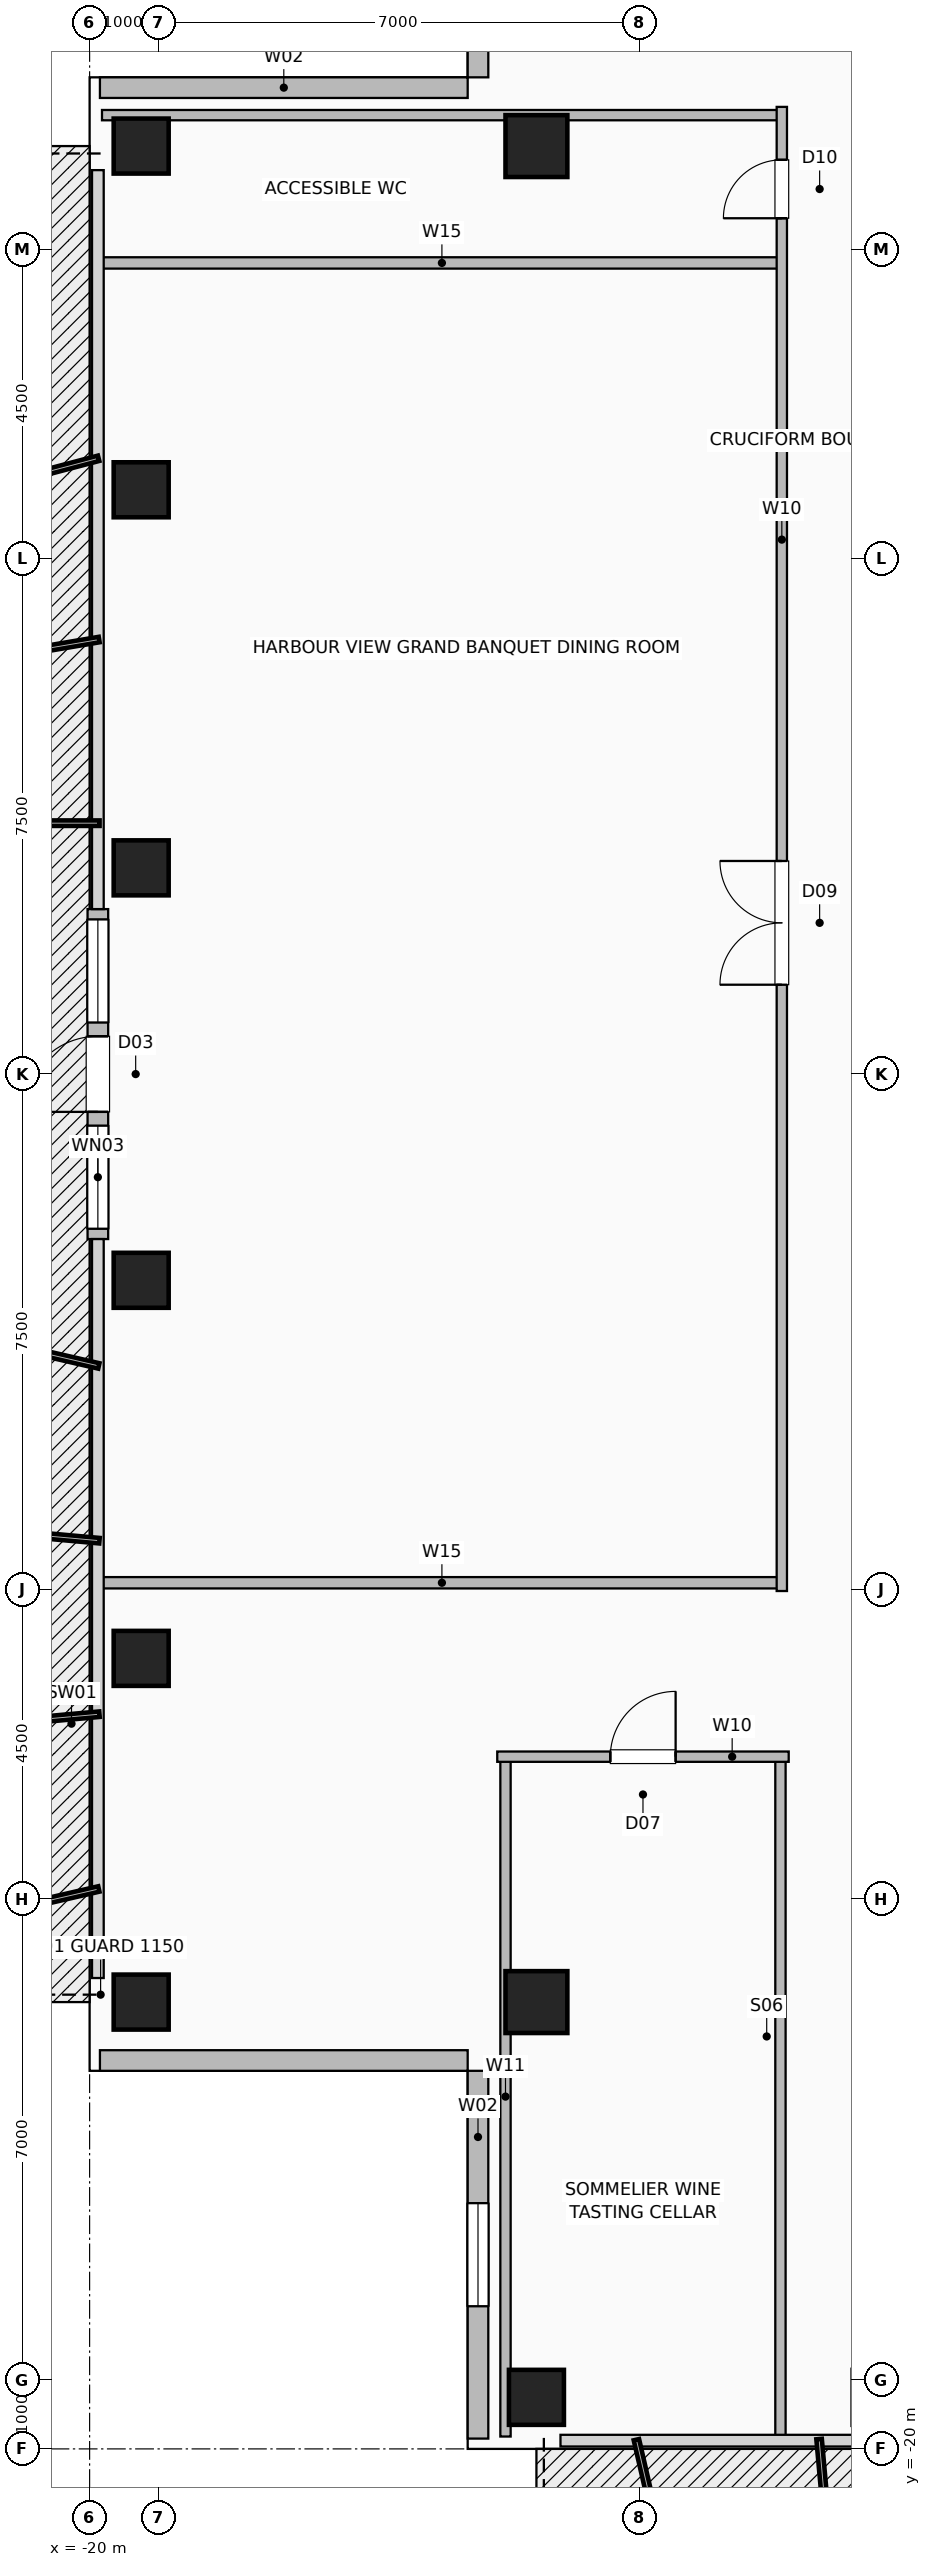
"""IFC4 building model, lengths in metres.
Left out: names, types, materials, properties, quantities, classifications, styles, units other than length and angle.
Written with IfcOpenShell. Run it as: python <this file> out.ifc"""

import sys

from ifc_helpers import new_model, si_unit, direction, frame, frame_2d, origin, origin_2d, place, context, subcontext, project, spatial, rectangle, hollow_rectangle, extrude, element, fill, save


model = new_model("IFC4")
c1 = context("Model", 3, precision=1e-05, world=origin(), true_north=direction((0.0, 1.0)))
c2 = subcontext(c1, "Body", "Model", "MODEL_VIEW")
j1 = project(units=[si_unit("LENGTHUNIT", "METRE"), si_unit("PLANEANGLEUNIT", "RADIAN")], contexts=[c1])
p1 = place(None, origin())
s1 = spatial("IfcSite", under=j1, at=p1, CompositionType="ELEMENT")
p2 = place(p1, origin())
s2 = spatial("IfcBuilding", under=s1, at=p2, CompositionType="ELEMENT")
p3 = place(p2, frame((0.0, 0.0, 195.0)))
s3 = spatial("IfcBuildingStorey", under=s2, at=p3, CompositionType="ELEMENT", Elevation=195.0)
for number, where, z_axis, x_axis in (
    (1, (-13.5, -19.25, 0.0), (0.0, 0.0, 1.0), (1.0, 0.0, 0.0)),
    (2, (-19.25, -13.5, 0.0), (0.0, 0.0, 1.0), (1.0, 0.0, 0.0)),
    (3, (-19.25, -8.5, 0.0), (0.0, 0.0, 1.0), (1.0, 0.0, 0.0)),
    (4, (-19.25, -3.0, 0.0), (0.0, 0.0, 1.0), (1.0, 0.0, 0.0)),
    (5, (-19.25, 3.0, 0.0), (0.0, 0.0, 1.0), (1.0, 0.0, 0.0)),
    (6, (-19.25, 8.5, 0.0), (0.0, 0.0, 1.0), (1.0, 0.0, 0.0)),
    (7, (-19.25, 13.5, 0.0), (0.0, 0.0, 1.0), (1.0, 0.0, 0.0)),
):
    element("IfcColumn", number, at=place(p3, frame(where, z_axis=z_axis, x_axis=x_axis)), inside=s3, PredefinedType="COLUMN", context=c2, shape_type="SweptSolid", body=[
        extrude(hollow_rectangle(XDim=0.8, YDim=0.8, WallThickness=0.04, at=origin_2d()), origin(), (0.0, 0.0, 1.0), 3.6),
    ])
for number, where, z_axis, x_axis in (
    (8, (-13.5, -13.5, 0.0), (0.0, 0.0, 1.0), (1.0, 0.0, 0.0)),
    (9, (-13.5, 13.5, 0.0), (0.0, 0.0, 1.0), (1.0, 0.0, 0.0)),
):
    element("IfcColumn", number, at=place(p3, frame(where, z_axis=z_axis, x_axis=x_axis)), inside=s3, PredefinedType="COLUMN", context=c2, shape_type="SweptSolid", body=[
        extrude(hollow_rectangle(XDim=0.9, YDim=0.9, WallThickness=0.045, at=origin_2d()), origin(), (0.0, 0.0, 1.0), 3.6),
    ])
p4 = place(p3, frame((-19.88, -2.4, 0.0), z_axis=(0.0, 0.0, 1.0), x_axis=(0.0, 1.0, 0.0)))
e10 = element("IfcWall", 10, at=p4, inside=s3, PredefinedType="SOLIDWALL", context=c2, shape_type="SweptSolid", body=[
    extrude(rectangle(XDim=4.8, YDim=0.3, at=frame_2d((2.4, 0.0))), origin(), (0.0, 0.0, 1.0), 3.36),
])
p5 = place(p4, frame((1.85, 0.0, 0.0)))
e11 = element("IfcOpeningElement", 11, at=p5, cuts=e10, PredefinedType="OPENING", context=c2, shape_type="SweptSolid", body=[
    extrude(rectangle(XDim=1.1, YDim=2.2, at=frame_2d((0.55, 1.1))), frame((0.0, 0.16, 0.0), z_axis=(0.0, -1.0, 0.0), x_axis=(1.0, 0.0, 0.0)), (0.0, 0.0, 1.0), 0.32),
])
p6 = place(p4, frame((0.15, 0.0, 0.85)))
e12 = element("IfcOpeningElement", 12, at=p6, cuts=e10, PredefinedType="OPENING", context=c2, shape_type="SweptSolid", body=[
    extrude(rectangle(XDim=1.5, YDim=1.8, at=frame_2d((0.75, 0.9))), frame((0.0, 0.16, 0.0), z_axis=(0.0, -1.0, 0.0), x_axis=(1.0, 0.0, 0.0)), (0.0, 0.0, 1.0), 0.32),
])
p7 = place(p4, frame((3.15, 0.0, 0.85)))
e13 = element("IfcOpeningElement", 13, at=p7, cuts=e10, PredefinedType="OPENING", context=c2, shape_type="SweptSolid", body=[
    extrude(rectangle(XDim=1.5, YDim=1.8, at=frame_2d((0.75, 0.9))), frame((0.0, 0.16, 0.0), z_axis=(0.0, -1.0, 0.0), x_axis=(1.0, 0.0, 0.0)), (0.0, 0.0, 1.0), 0.32),
])
p8 = place(p3, frame((-14.35, -19.85, 0.0), z_axis=(0.0, 0.0, 1.0), x_axis=(0.0, 1.0, 0.0)))
e14 = element("IfcWall", 14, at=p8, inside=s3, PredefinedType="SOLIDWALL", context=c2, shape_type="SweptSolid", body=[
    extrude(rectangle(XDim=5.35, YDim=0.3, at=frame_2d((2.675, 0.0))), origin(), (0.0, 0.0, 1.0), 3.36),
])
p9 = place(p8, frame((1.925, 0.0, 0.9)))
e15 = element("IfcOpeningElement", 15, at=p9, cuts=e14, PredefinedType="OPENING", context=c2, shape_type="SweptSolid", body=[
    extrude(rectangle(XDim=1.5, YDim=1.8, at=frame_2d((0.75, 0.9))), frame((0.0, 0.16, 0.0), z_axis=(0.0, -1.0, 0.0), x_axis=(1.0, 0.0, 0.0)), (0.0, 0.0, 1.0), 0.32),
])
p10 = place(p3, frame((-19.85, -14.35, 0.0), z_axis=(0.0, 0.0, 1.0), x_axis=(1.0, 0.0, 0.0)))
e16 = element("IfcWall", 16, at=p10, inside=s3, PredefinedType="SOLIDWALL", context=c2, shape_type="SweptSolid", body=[
    extrude(rectangle(XDim=5.35, YDim=0.3, at=frame_2d((2.675, 0.0))), origin(), (0.0, 0.0, 1.0), 3.36),
])
p11 = place(p3, frame((-14.35, 19.85, 0.0), z_axis=(0.0, 0.0, 1.0), x_axis=(0.0, -1.0, 0.0)))
e17 = element("IfcWall", 17, at=p11, inside=s3, PredefinedType="SOLIDWALL", context=c2, shape_type="SweptSolid", body=[
    extrude(rectangle(XDim=5.35, YDim=0.3, at=frame_2d((2.675, 0.0))), origin(), (0.0, 0.0, 1.0), 3.36),
])
p12 = place(p11, frame((1.925, 0.0, 0.9)))
e18 = element("IfcOpeningElement", 18, at=p12, cuts=e17, PredefinedType="OPENING", context=c2, shape_type="SweptSolid", body=[
    extrude(rectangle(XDim=1.5, YDim=1.8, at=frame_2d((0.75, 0.9))), frame((0.0, 0.16, 0.0), z_axis=(0.0, -1.0, 0.0), x_axis=(1.0, 0.0, 0.0)), (0.0, 0.0, 1.0), 0.32),
])
p13 = place(p3, frame((-19.85, 14.35, 0.0), z_axis=(0.0, 0.0, 1.0), x_axis=(1.0, 0.0, 0.0)))
e19 = element("IfcWall", 19, at=p13, inside=s3, PredefinedType="SOLIDWALL", context=c2, shape_type="SweptSolid", body=[
    extrude(rectangle(XDim=5.35, YDim=0.3, at=frame_2d((2.675, 0.0))), origin(), (0.0, 0.0, 1.0), 3.36),
])
for number, where, z_axis, x_axis in (
    (20, (-13.95, -19.82, 0.0), (0.0, 0.0, 1.0), (0.0, 1.0, 0.0)),
    (21, (-9.95, -19.82, 0.0), (0.0, 0.0, 1.0), (0.0, 1.0, 0.0)),
):
    element("IfcWall", number, at=place(p3, frame(where, z_axis=z_axis, x_axis=x_axis)), inside=s3, PredefinedType="PARTITIONING", context=c2, shape_type="SweptSolid", body=[
        extrude(rectangle(XDim=9.89, YDim=0.15, at=frame_2d((4.945, 0.0))), origin(), (0.0, 0.0, 1.0), 3.36),
    ])
p14 = place(p3, frame((-14.07, -9.93, 0.0), z_axis=(0.0, 0.0, 1.0), x_axis=(1.0, 0.0, 0.0)))
e22 = element("IfcWall", 22, at=p14, inside=s3, PredefinedType="PARTITIONING", context=c2, shape_type="SweptSolid", body=[
    extrude(rectangle(XDim=4.24, YDim=0.15, at=frame_2d((2.12, 0.0))), origin(), (0.0, 0.0, 1.0), 3.36),
])
p15 = place(p14, frame((1.645, 0.0, 0.0)))
e23 = element("IfcOpeningElement", 23, at=p15, cuts=e22, PredefinedType="OPENING", context=c2, shape_type="SweptSolid", body=[
    extrude(rectangle(XDim=0.95, YDim=2.06, at=frame_2d((0.475, 1.03))), frame((0.0, 0.085, 0.0), z_axis=(0.0, -1.0, 0.0), x_axis=(1.0, 0.0, 0.0)), (0.0, 0.0, 1.0), 0.17),
])
for number, where, z_axis, x_axis in (
    (24, (-19.82, -7.4, 0.0), (0.0, 0.0, 1.0), (1.0, 0.0, 0.0)),
    (25, (-19.82, 11.8, 0.0), (0.0, 0.0, 1.0), (1.0, 0.0, 0.0)),
):
    element("IfcWall", number, at=place(p3, frame(where, z_axis=z_axis, x_axis=x_axis)), inside=s3, PredefinedType="PLUMBINGWALL", context=c2, shape_type="SweptSolid", body=[
        extrude(rectangle(XDim=9.89, YDim=0.165, at=frame_2d((4.945, 0.0))), origin(), (0.0, 0.0, 1.0), 3.36),
    ])
p16 = place(p3, frame((-19.82, 13.95, 0.0), z_axis=(0.0, 0.0, 1.0), x_axis=(1.0, 0.0, 0.0)))
e26 = element("IfcWall", 26, at=p16, inside=s3, PredefinedType="PARTITIONING", context=c2, shape_type="SweptSolid", body=[
    extrude(rectangle(XDim=9.89, YDim=0.15, at=frame_2d((4.945, 0.0))), origin(), (0.0, 0.0, 1.0), 3.36),
])
p17 = place(p3, frame((-9.93, -7.52, 0.0), z_axis=(0.0, 0.0, 1.0), x_axis=(0.0, 1.0, 0.0)))
e27 = element("IfcWall", 27, at=p17, inside=s3, PredefinedType="PARTITIONING", context=c2, shape_type="SweptSolid", body=[
    extrude(rectangle(XDim=21.59, YDim=0.15, at=frame_2d((10.795, 0.0))), origin(), (0.0, 0.0, 1.0), 3.36),
])
p18 = place(p17, frame((8.82, 0.0, 0.0)))
e28 = element("IfcOpeningElement", 28, at=p18, cuts=e27, PredefinedType="OPENING", context=c2, shape_type="SweptSolid", body=[
    extrude(rectangle(XDim=1.8, YDim=2.08, at=frame_2d((0.9, 1.04))), frame((0.0, 0.085, 0.0), z_axis=(0.0, -1.0, 0.0), x_axis=(1.0, 0.0, 0.0)), (0.0, 0.0, 1.0), 0.17),
])
p19 = place(p17, frame((19.97, 0.0, 0.0)))
e29 = element("IfcOpeningElement", 29, at=p19, cuts=e27, PredefinedType="OPENING", context=c2, shape_type="SweptSolid", body=[
    extrude(rectangle(XDim=0.85, YDim=2.05, at=frame_2d((0.425, 1.025))), frame((0.0, 0.085, 0.0), z_axis=(0.0, -1.0, 0.0), x_axis=(1.0, 0.0, 0.0)), (0.0, 0.0, 1.0), 0.17),
])
p20 = place(p5, origin())
e30 = element("IfcDoor", 30, at=p20, inside=s3, OperationType="SINGLE_SWING_LEFT", PredefinedType="DOOR", context=c2, shape_type="SweptSolid", body=[
    extrude(rectangle(XDim=1.1, YDim=2.2, at=frame_2d((0.55, 1.1))), frame((0.0, 0.025, 0.0), z_axis=(0.0, -1.0, 0.0), x_axis=(1.0, 0.0, 0.0)), (0.0, 0.0, 1.0), 0.05),
])
fill(e11, e30)
p21 = place(p6, origin())
e31 = element("IfcWindow", 31, at=p21, inside=s3, PartitioningType="SINGLE_PANEL", PredefinedType="WINDOW", context=c2, shape_type="SweptSolid", body=[
    extrude(rectangle(XDim=1.5, YDim=1.8, at=frame_2d((0.75, 0.9))), frame((0.0, 0.03, 0.0), z_axis=(0.0, -1.0, 0.0), x_axis=(1.0, 0.0, 0.0)), (0.0, 0.0, 1.0), 0.06),
])
fill(e12, e31)
p22 = place(p7, origin())
e32 = element("IfcWindow", 32, at=p22, inside=s3, PartitioningType="SINGLE_PANEL", PredefinedType="WINDOW", context=c2, shape_type="SweptSolid", body=[
    extrude(rectangle(XDim=1.5, YDim=1.8, at=frame_2d((0.75, 0.9))), frame((0.0, 0.03, 0.0), z_axis=(0.0, -1.0, 0.0), x_axis=(1.0, 0.0, 0.0)), (0.0, 0.0, 1.0), 0.06),
])
fill(e13, e32)
p23 = place(p9, origin())
e33 = element("IfcWindow", 33, at=p23, inside=s3, PartitioningType="SINGLE_PANEL", PredefinedType="WINDOW", context=c2, shape_type="SweptSolid", body=[
    extrude(rectangle(XDim=1.5, YDim=1.8, at=frame_2d((0.75, 0.9))), frame((0.0, 0.03, 0.0), z_axis=(0.0, -1.0, 0.0), x_axis=(1.0, 0.0, 0.0)), (0.0, 0.0, 1.0), 0.06),
])
fill(e15, e33)
p24 = place(p15, origin())
e34 = element("IfcDoor", 34, at=p24, inside=s3, OperationType="SINGLE_SWING_RIGHT", PredefinedType="DOOR", context=c2, shape_type="SweptSolid", body=[
    extrude(rectangle(XDim=0.95, YDim=2.06, at=frame_2d((0.475, 1.03))), frame((0.0, 0.025, 0.0), z_axis=(0.0, -1.0, 0.0), x_axis=(1.0, 0.0, 0.0)), (0.0, 0.0, 1.0), 0.05),
])
fill(e23, e34)
p25 = place(p18, origin())
e35 = element("IfcDoor", 35, at=p25, inside=s3, OperationType="DOUBLE_DOOR_SINGLE_SWING", PredefinedType="DOOR", context=c2, shape_type="SweptSolid", body=[
    extrude(rectangle(XDim=1.8, YDim=2.08, at=frame_2d((0.9, 1.04))), frame((0.0, 0.025, 0.0), z_axis=(0.0, -1.0, 0.0), x_axis=(1.0, 0.0, 0.0)), (0.0, 0.0, 1.0), 0.05),
])
fill(e28, e35)
p26 = place(p19, origin())
e36 = element("IfcDoor", 36, at=p26, inside=s3, OperationType="SINGLE_SWING_LEFT", PredefinedType="DOOR", context=c2, shape_type="SweptSolid", body=[
    extrude(rectangle(XDim=0.85, YDim=2.05, at=frame_2d((0.425, 1.025))), frame((0.0, 0.025, 0.0), z_axis=(0.0, -1.0, 0.0), x_axis=(1.0, 0.0, 0.0)), (0.0, 0.0, 1.0), 0.05),
])
fill(e29, e36)
save(model, sys.argv[1])
